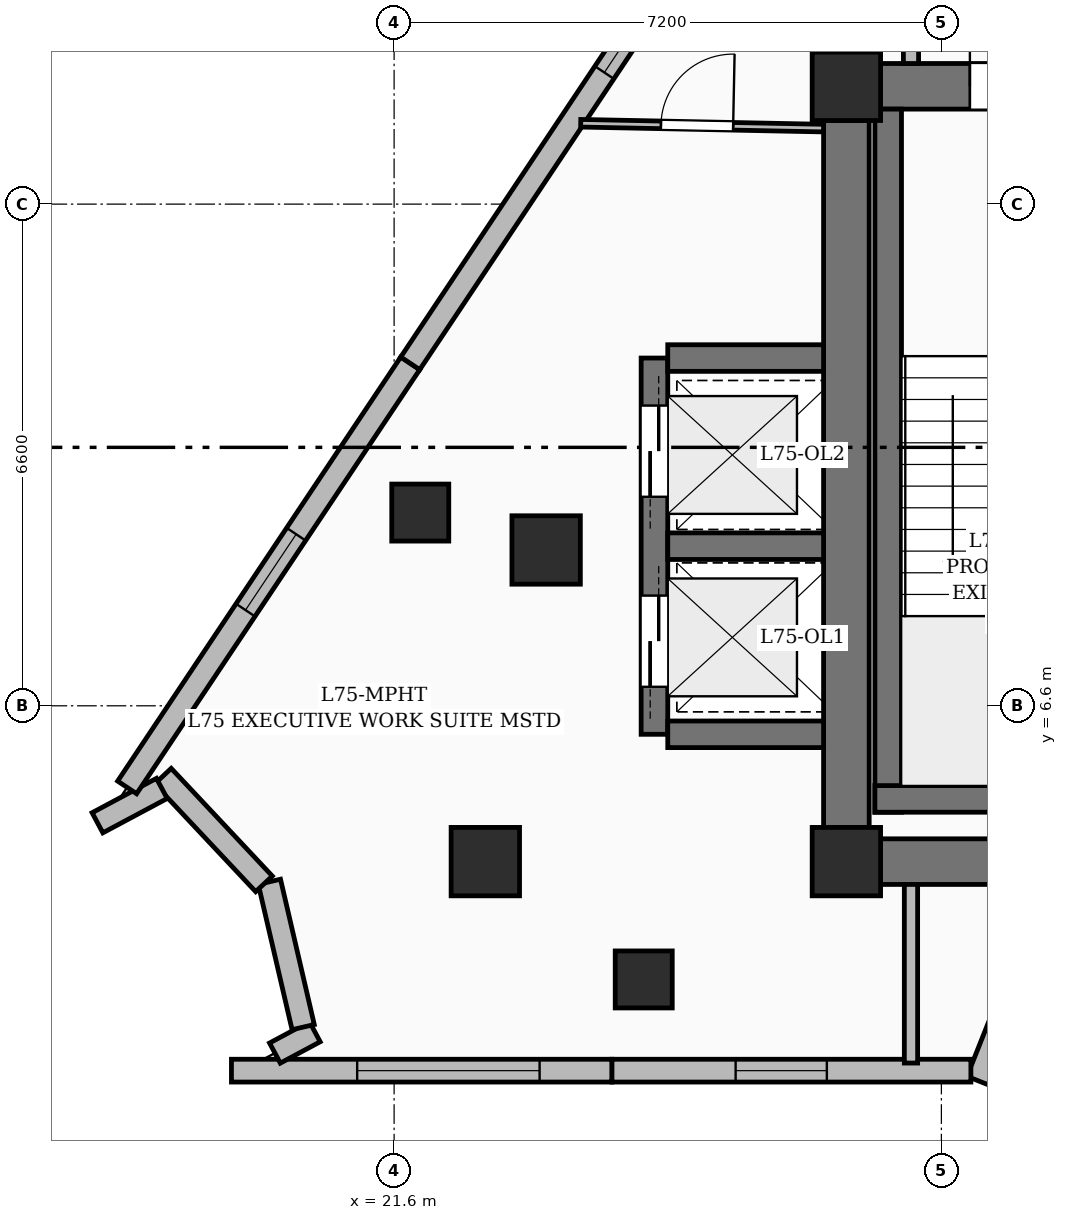
"""IFC4 building model, lengths in metres.
Left out: names, types, materials, properties, quantities, classifications, styles, units other than length and angle.
Written with IfcOpenShell. Run it as: python <this file> out.ifc"""

import sys

from ifc_helpers import new_model, si_unit, direction, frame, frame_2d, origin, origin_2d, place, context, subcontext, project, spatial, rectangle, extrude, element, fill, save


model = new_model("IFC4")
c1 = context("Model", 3, precision=1e-05, world=origin(), true_north=direction((0.0, 1.0)))
c2 = subcontext(c1, "Body", "Model", "MODEL_VIEW")
j1 = project(units=[si_unit("LENGTHUNIT", "METRE"), si_unit("PLANEANGLEUNIT", "RADIAN")], contexts=[c1])
p1 = place(None, origin())
s1 = spatial("IfcSite", under=j1, at=p1, CompositionType="ELEMENT")
p2 = place(p1, origin())
s2 = spatial("IfcBuilding", under=s1, at=p2, CompositionType="ELEMENT")
p3 = place(p2, frame((0.0, 0.0, 289.5)))
s3 = spatial("IfcBuildingStorey", under=s2, at=p3, CompositionType="ELEMENT", Elevation=289.5)
for number, where, z_axis, x_axis in (
    (1, (27.55, 4.55, 0.0), (0.0, 0.0, 1.0), (1.0, 0.0, 0.0)),
    (2, (27.55, 14.75, 0.0), (0.0, 0.0, 1.0), (1.0, 0.0, 0.0)),
    (3, (22.8, 4.55, 0.0), (0.0, 0.0, 1.0), (1.0, 0.0, 0.0)),
    (4, (23.6, 8.65, 0.0), (0.0, 0.0, 1.0), (1.0, 0.0, 0.0)),
):
    element("IfcColumn", number, at=place(p3, frame(where, z_axis=z_axis, x_axis=x_axis)), inside=s3, PredefinedType="COLUMN", context=c2, shape_type="SweptSolid", body=[
        extrude(rectangle(XDim=0.9, YDim=0.9, at=origin_2d()), origin(), (0.0, 0.0, 1.0), 4.5),
    ])
p4 = place(p3, frame((28.0, 4.55, 0.0), z_axis=(0.0, 0.0, 1.0), x_axis=(1.0, 0.0, 0.0)))
e5 = element("IfcWall", 5, at=p4, inside=s3, PredefinedType="SHEAR", context=c2, shape_type="SweptSolid", body=[
    extrude(rectangle(XDim=6.7, YDim=0.6, at=frame_2d((3.35, 0.0))), origin(), (0.0, 0.0, 1.0), 4.5),
])
p5 = place(p3, frame((28.0, 14.75, 0.0), z_axis=(0.0, 0.0, 1.0), x_axis=(1.0, 0.0, 0.0)))
e6 = element("IfcWall", 6, at=p5, inside=s3, PredefinedType="SHEAR", context=c2, shape_type="SweptSolid", body=[
    extrude(rectangle(XDim=6.7, YDim=0.6, at=frame_2d((3.35, 0.0))), origin(), (0.0, 0.0, 1.0), 4.5),
])
p6 = place(p5, frame((1.175, 0.0, 0.0)))
e7 = element("IfcOpeningElement", 7, at=p6, cuts=e6, PredefinedType="OPENING", context=c2, shape_type="SweptSolid", body=[
    extrude(rectangle(XDim=1.05, YDim=2.15, at=frame_2d((0.525, 1.075))), frame((0.0, 0.31, 0.0), z_axis=(0.0, -1.0, 0.0), x_axis=(1.0, 0.0, 0.0)), (0.0, 0.0, 1.0), 0.62),
])
p7 = place(p5, frame((5.025, 0.0, 0.0)))
e8 = element("IfcOpeningElement", 8, at=p7, cuts=e6, PredefinedType="OPENING", context=c2, shape_type="SweptSolid", body=[
    extrude(rectangle(XDim=0.95, YDim=2.15, at=frame_2d((0.475, 1.075))), frame((0.0, 0.31, 0.0), z_axis=(0.0, -1.0, 0.0), x_axis=(1.0, 0.0, 0.0)), (0.0, 0.0, 1.0), 0.62),
])
p8 = place(p3, frame((27.55, 5.0, 0.0), z_axis=(0.0, 0.0, 1.0), x_axis=(0.0, 1.0, 0.0)))
e9 = element("IfcWall", 9, at=p8, inside=s3, PredefinedType="SHEAR", context=c2, shape_type="SweptSolid", body=[
    extrude(rectangle(XDim=9.3, YDim=0.6, at=frame_2d((4.65, 0.0))), origin(), (0.0, 0.0, 1.0), 4.5),
])
p9 = place(p3, frame((28.1, 5.2, 0.0), z_axis=(0.0, 0.0, 1.0), x_axis=(0.0, 1.0, 0.0)))
e10 = element("IfcWall", 10, at=p9, inside=s3, PredefinedType="SOLIDWALL", context=c2, shape_type="SweptSolid", body=[
    extrude(rectangle(XDim=9.25, YDim=0.35, at=frame_2d((4.625, 0.0))), origin(), (0.0, 0.0, 1.0), 4.5),
])
p10 = place(p3, frame((27.925, 5.375, 0.0), z_axis=(0.0, 0.0, 1.0), x_axis=(1.0, 0.0, 0.0)))
e11 = element("IfcWall", 11, at=p10, inside=s3, PredefinedType="SOLIDWALL", context=c2, shape_type="SweptSolid", body=[
    extrude(rectangle(XDim=3.55, YDim=0.35, at=frame_2d((1.775, 0.0))), origin(), (0.0, 0.0, 1.0), 4.5),
])
p11 = place(p3, frame((25.025, 6.225, 0.0), z_axis=(0.0, 0.0, 1.0), x_axis=(0.0, 1.0, 0.0)))
e12 = element("IfcWall", 12, at=p11, inside=s3, PredefinedType="SOLIDWALL", context=c2, shape_type="SweptSolid", body=[
    extrude(rectangle(XDim=4.95, YDim=0.35, at=frame_2d((2.475, 0.0))), origin(), (0.0, 0.0, 1.0), 4.5),
])
p12 = place(p11, frame((0.625, 0.0, 0.0)))
e13 = element("IfcOpeningElement", 13, at=p12, cuts=e12, PredefinedType="OPENING", context=c2, shape_type="SweptSolid", body=[
    extrude(rectangle(XDim=1.2, YDim=2.2, at=frame_2d((0.6, 1.1))), frame((0.0, 0.185, 0.0), z_axis=(0.0, -1.0, 0.0), x_axis=(1.0, 0.0, 0.0)), (0.0, 0.0, 1.0), 0.37),
])
p13 = place(p11, frame((3.125, 0.0, 0.0)))
e14 = element("IfcOpeningElement", 14, at=p13, cuts=e12, PredefinedType="OPENING", context=c2, shape_type="SweptSolid", body=[
    extrude(rectangle(XDim=1.2, YDim=2.2, at=frame_2d((0.6, 1.1))), frame((0.0, 0.185, 0.0), z_axis=(0.0, -1.0, 0.0), x_axis=(1.0, 0.0, 0.0)), (0.0, 0.0, 1.0), 0.37),
])
for number, where, z_axis, x_axis in (
    (15, (25.2, 6.225, 0.0), (0.0, 0.0, 1.0), (1.0, 0.0, 0.0)),
    (16, (25.2, 8.7, 0.0), (0.0, 0.0, 1.0), (1.0, 0.0, 0.0)),
    (17, (25.2, 11.175, 0.0), (0.0, 0.0, 1.0), (1.0, 0.0, 0.0)),
):
    element("IfcWall", number, at=place(p3, frame(where, z_axis=z_axis, x_axis=x_axis)), inside=s3, PredefinedType="SOLIDWALL", context=c2, shape_type="SweptSolid", body=[
        extrude(rectangle(XDim=2.05, YDim=0.35, at=frame_2d((1.025, 0.0))), origin(), (0.0, 0.0, 1.0), 4.5),
    ])
for number, where, z_axis, x_axis in (
    (18, (24.884, 3.0, 0.0), (0.0, 0.0, 1.0), (1.0, 0.0, 0.0)),
    (19, (21.944, 9.142, 0.0), (0.0, 0.0, 1.0), (1.0, 0.0, 0.0)),
):
    element("IfcColumn", number, at=place(p3, frame(where, z_axis=z_axis, x_axis=x_axis)), inside=s3, PredefinedType="COLUMN", context=c2, shape_type="SweptSolid", body=[
        extrude(rectangle(XDim=0.75, YDim=0.75, at=origin_2d()), origin(), (0.0, 0.0, 1.0), 4.5),
    ])
p14 = place(p3, frame((30.312, 4.273, 0.0), z_axis=(0.0, 0.0, 1.0), x_axis=(-0.369466825356, -0.929243921132, 0.0)))
e20 = element("IfcWall", 20, at=p14, inside=s3, PredefinedType="SOLIDWALL", context=c2, shape_type="SweptSolid", body=[
    extrude(rectangle(XDim=2.802, YDim=0.3, at=frame_2d((1.401, 0.0))), origin(), (0.0, 0.0, 1.0), 3.396),
])
p15 = place(p14, frame((0.883, 0.0, 0.8)))
e21 = element("IfcOpeningElement", 21, at=p15, cuts=e20, PredefinedType="OPENING", context=c2, shape_type="SweptSolid", body=[
    extrude(rectangle(XDim=1.2, YDim=1.8, at=frame_2d((0.6, 0.9))), frame((0.0, 0.16, 0.0), z_axis=(0.0, -1.0, 0.0), x_axis=(1.0, 0.0, 0.0)), (0.0, 0.0, 1.0), 0.32),
])
p16 = place(p3, frame((29.188, 1.8, 0.0), z_axis=(0.0, 0.0, 1.0), x_axis=(-1.0, 0.0, 0.0)))
e22 = element("IfcWall", 22, at=p16, inside=s3, PredefinedType="SOLIDWALL", context=c2, shape_type="SweptSolid", body=[
    extrude(rectangle(XDim=4.724, YDim=0.3, at=frame_2d((2.362, 0.0))), origin(), (0.0, 0.0, 1.0), 4.2),
])
p17 = place(p16, frame((1.895, 0.0, 0.8)))
e23 = element("IfcOpeningElement", 23, at=p17, cuts=e22, PredefinedType="OPENING", context=c2, shape_type="SweptSolid", body=[
    extrude(rectangle(XDim=1.2, YDim=1.8, at=frame_2d((0.6, 0.9))), frame((0.0, 0.16, 0.0), z_axis=(0.0, -1.0, 0.0), x_axis=(1.0, 0.0, 0.0)), (0.0, 0.0, 1.0), 0.32),
])
p18 = place(p3, frame((24.464, 1.8, 0.0), z_axis=(0.0, 0.0, 1.0), x_axis=(-1.0, 0.0, 0.0)))
e24 = element("IfcWall", 24, at=p18, inside=s3, PredefinedType="SOLIDWALL", context=c2, shape_type="SweptSolid", body=[
    extrude(rectangle(XDim=5.004, YDim=0.3, at=frame_2d((2.502, 0.0))), origin(), (0.0, 0.0, 1.0), 4.2),
])
p19 = place(p18, frame((0.95, 0.0, 0.6)))
e25 = element("IfcOpeningElement", 25, at=p19, cuts=e24, PredefinedType="OPENING", context=c2, shape_type="SweptSolid", body=[
    extrude(rectangle(XDim=2.4, YDim=2.1, at=frame_2d((1.2, 1.05))), frame((0.0, 0.16, 0.0), z_axis=(0.0, -1.0, 0.0), x_axis=(1.0, 0.0, 0.0)), (0.0, 0.0, 1.0), 0.32),
])
p20 = place(p3, frame((20.032, 2.031, 0.0), z_axis=(0.0, 0.0, 1.0), x_axis=(0.881601971089, 0.471993606495, 0.0)))
e26 = element("IfcWall", 26, at=p20, inside=s3, PredefinedType="SOLIDWALL", context=c2, shape_type="SweptSolid", body=[
    extrude(rectangle(XDim=0.595, YDim=0.3, at=frame_2d((0.297, 0.0))), origin(), (0.0, 0.0, 1.0), 4.2),
])
p21 = place(p3, frame((20.404, 2.373, 0.0), z_axis=(0.0, 0.0, 1.0), x_axis=(-0.226376282289, 0.974039926706, 0.0)))
e27 = element("IfcWall", 27, at=p21, inside=s3, PredefinedType="SOLIDWALL", context=c2, shape_type="SweptSolid", body=[
    extrude(rectangle(XDim=1.963, YDim=0.3, at=frame_2d((0.981, 0.0))), origin(), (0.0, 0.0, 1.0), 4.2),
])
p22 = place(p3, frame((19.888, 4.257, 0.0), z_axis=(0.0, 0.0, 1.0), x_axis=(-0.684454988333, 0.72905512065, 0.0)))
e28 = element("IfcWall", 28, at=p22, inside=s3, PredefinedType="SOLIDWALL", context=c2, shape_type="SweptSolid", body=[
    extrude(rectangle(XDim=1.943, YDim=0.3, at=frame_2d((0.972, 0.0))), origin(), (0.0, 0.0, 1.0), 4.2),
])
p23 = place(p3, frame((18.544, 5.513, 0.0), z_axis=(0.0, 0.0, 1.0), x_axis=(-0.881986380724, -0.471274892412, 0.0)))
e29 = element("IfcWall", 29, at=p23, inside=s3, PredefinedType="SOLIDWALL", context=c2, shape_type="SweptSolid", body=[
    extrude(rectangle(XDim=0.959, YDim=0.3, at=frame_2d((0.48, 0.0))), origin(), (0.0, 0.0, 1.0), 4.2),
])
p24 = place(p3, frame((18.087, 5.526, 0.0), z_axis=(0.0, 0.0, 1.0), x_axis=(0.555237602255, 0.831691772859, 0.0)))
e30 = element("IfcWall", 30, at=p24, inside=s3, PredefinedType="SOLIDWALL", context=c2, shape_type="SweptSolid", body=[
    extrude(rectangle(XDim=6.708, YDim=0.3, at=frame_2d((3.354, 0.0))), origin(), (0.0, 0.0, 1.0), 4.2),
])
p25 = place(p24, frame((2.805, 0.0, 0.8)))
e31 = element("IfcOpeningElement", 31, at=p25, cuts=e30, PredefinedType="OPENING", context=c2, shape_type="SweptSolid", body=[
    extrude(rectangle(XDim=1.2, YDim=1.8, at=frame_2d((0.6, 0.9))), frame((0.0, 0.16, 0.0), z_axis=(0.0, -1.0, 0.0), x_axis=(1.0, 0.0, 0.0)), (0.0, 0.0, 1.0), 0.32),
])
p26 = place(p3, frame((21.812, 11.105, 0.0), z_axis=(0.0, 0.0, 1.0), x_axis=(0.555222871335, 0.831701607036, 0.0)))
e32 = element("IfcWall", 32, at=p26, inside=s3, PredefinedType="SOLIDWALL", context=c2, shape_type="SweptSolid", body=[
    extrude(rectangle(XDim=7.328, YDim=0.3, at=frame_2d((3.664, 0.0))), origin(), (0.0, 0.0, 1.0), 4.2),
])
p27 = place(p26, frame((4.6, 0.0, 0.55)))
e33 = element("IfcOpeningElement", 33, at=p27, cuts=e32, PredefinedType="OPENING", context=c2, shape_type="SweptSolid", body=[
    extrude(rectangle(XDim=2.1, YDim=2.4, at=frame_2d((1.05, 1.2))), frame((0.0, 0.16, 0.0), z_axis=(0.0, -1.0, 0.0), x_axis=(1.0, 0.0, 0.0)), (0.0, 0.0, 1.0), 0.32),
])
p28 = place(p3, frame((28.4, 4.25, 0.0), z_axis=(0.0, 0.0, 1.0), x_axis=(0.0, -1.0, 0.0)))
e34 = element("IfcWall", 34, at=p28, inside=s3, PredefinedType="PARTITIONING", context=c2, shape_type="SweptSolid", body=[
    extrude(rectangle(XDim=2.35, YDim=0.175, at=frame_2d((1.175, 0.0))), origin(), (0.0, 0.0, 1.0), 3.391),
])
p29 = place(p3, frame((28.4, 15.05, 0.0), z_axis=(0.0, 0.0, 1.0), x_axis=(0.0, 1.0, 0.0)))
e35 = element("IfcWall", 35, at=p29, inside=s3, PredefinedType="PARTITIONING", context=c2, shape_type="SweptSolid", body=[
    extrude(rectangle(XDim=2.3, YDim=0.2, at=frame_2d((1.15, 0.0))), origin(), (0.0, 0.0, 1.0), 3.535),
])
p30 = place(p3, frame((24.055, 14.264, 0.0), z_axis=(0.0, 0.0, 1.0), x_axis=(0.99979966268, -0.020015856317, 0.0)))
e36 = element("IfcWall", 36, at=p30, inside=s3, PredefinedType="PARTITIONING", context=c2, shape_type="SweptSolid", body=[
    extrude(rectangle(XDim=3.196, YDim=0.1, at=frame_2d((1.598, 0.0))), origin(), (0.0, 0.0, 1.0), 3.391),
])
p31 = place(p30, frame((1.056, 0.0, 0.0)))
e37 = element("IfcOpeningElement", 37, at=p31, cuts=e36, PredefinedType="OPENING", context=c2, shape_type="SweptSolid", body=[
    extrude(rectangle(XDim=0.95, YDim=2.2, at=frame_2d((0.475, 1.1))), frame((0.0, 0.06, 0.0), z_axis=(0.0, -1.0, 0.0), x_axis=(1.0, 0.0, 0.0)), (0.0, 0.0, 1.0), 0.12),
])
p32 = place(p17, origin())
e38 = element("IfcWindow", 38, at=p32, inside=s3, PartitioningType="SINGLE_PANEL", PredefinedType="WINDOW", context=c2, shape_type="SweptSolid", body=[
    extrude(rectangle(XDim=1.2, YDim=1.8, at=frame_2d((0.6, 0.9))), frame((0.0, 0.03, 0.0), z_axis=(0.0, -1.0, 0.0), x_axis=(1.0, 0.0, 0.0)), (0.0, 0.0, 1.0), 0.06),
])
fill(e23, e38)
p33 = place(p19, origin())
e39 = element("IfcWindow", 39, at=p33, inside=s3, PartitioningType="SINGLE_PANEL", PredefinedType="WINDOW", context=c2, shape_type="SweptSolid", body=[
    extrude(rectangle(XDim=2.4, YDim=2.1, at=frame_2d((1.2, 1.05))), frame((0.0, 0.03, 0.0), z_axis=(0.0, -1.0, 0.0), x_axis=(1.0, 0.0, 0.0)), (0.0, 0.0, 1.0), 0.06),
])
fill(e25, e39)
p34 = place(p25, origin())
e40 = element("IfcWindow", 40, at=p34, inside=s3, PartitioningType="SINGLE_PANEL", PredefinedType="WINDOW", context=c2, shape_type="SweptSolid", body=[
    extrude(rectangle(XDim=1.2, YDim=1.8, at=frame_2d((0.6, 0.9))), frame((0.0, 0.03, 0.0), z_axis=(0.0, -1.0, 0.0), x_axis=(1.0, 0.0, 0.0)), (0.0, 0.0, 1.0), 0.06),
])
fill(e31, e40)
p35 = place(p27, origin())
e41 = element("IfcWindow", 41, at=p35, inside=s3, PartitioningType="SINGLE_PANEL", PredefinedType="WINDOW", context=c2, shape_type="SweptSolid", body=[
    extrude(rectangle(XDim=2.1, YDim=2.4, at=frame_2d((1.05, 1.2))), frame((0.0, 0.03, 0.0), z_axis=(0.0, -1.0, 0.0), x_axis=(1.0, 0.0, 0.0)), (0.0, 0.0, 1.0), 0.06),
])
fill(e33, e41)
p36 = place(p6, origin())
e42 = element("IfcDoor", 42, at=p36, inside=s3, OperationType="SINGLE_SWING_LEFT", PredefinedType="DOOR", context=c2, shape_type="SweptSolid", body=[
    extrude(rectangle(XDim=1.05, YDim=2.15, at=frame_2d((0.525, 1.075))), frame((0.0, 0.025, 0.0), z_axis=(0.0, -1.0, 0.0), x_axis=(1.0, 0.0, 0.0)), (0.0, 0.0, 1.0), 0.05),
])
fill(e7, e42)
p37 = place(p12, origin())
e43 = element("IfcDoor", 43, at=p37, inside=s3, OperationType="DOUBLE_DOOR_SLIDING", PredefinedType="DOOR", context=c2, shape_type="SweptSolid", body=[
    extrude(rectangle(XDim=1.2, YDim=2.2, at=frame_2d((0.6, 1.1))), frame((0.0, 0.025, 0.0), z_axis=(0.0, -1.0, 0.0), x_axis=(1.0, 0.0, 0.0)), (0.0, 0.0, 1.0), 0.05),
])
fill(e13, e43)
p38 = place(p13, origin())
e44 = element("IfcDoor", 44, at=p38, inside=s3, OperationType="DOUBLE_DOOR_SLIDING", PredefinedType="DOOR", context=c2, shape_type="SweptSolid", body=[
    extrude(rectangle(XDim=1.2, YDim=2.2, at=frame_2d((0.6, 1.1))), frame((0.0, 0.025, 0.0), z_axis=(0.0, -1.0, 0.0), x_axis=(1.0, 0.0, 0.0)), (0.0, 0.0, 1.0), 0.05),
])
fill(e14, e44)
p39 = place(p31, origin())
e45 = element("IfcDoor", 45, at=p39, inside=s3, OperationType="SINGLE_SWING_RIGHT", PredefinedType="DOOR", context=c2, shape_type="SweptSolid", body=[
    extrude(rectangle(XDim=0.95, YDim=2.2, at=frame_2d((0.475, 1.1))), frame((0.0, 0.025, 0.0), z_axis=(0.0, -1.0, 0.0), x_axis=(1.0, 0.0, 0.0)), (0.0, 0.0, 1.0), 0.05),
])
fill(e37, e45)
save(model, sys.argv[1])
